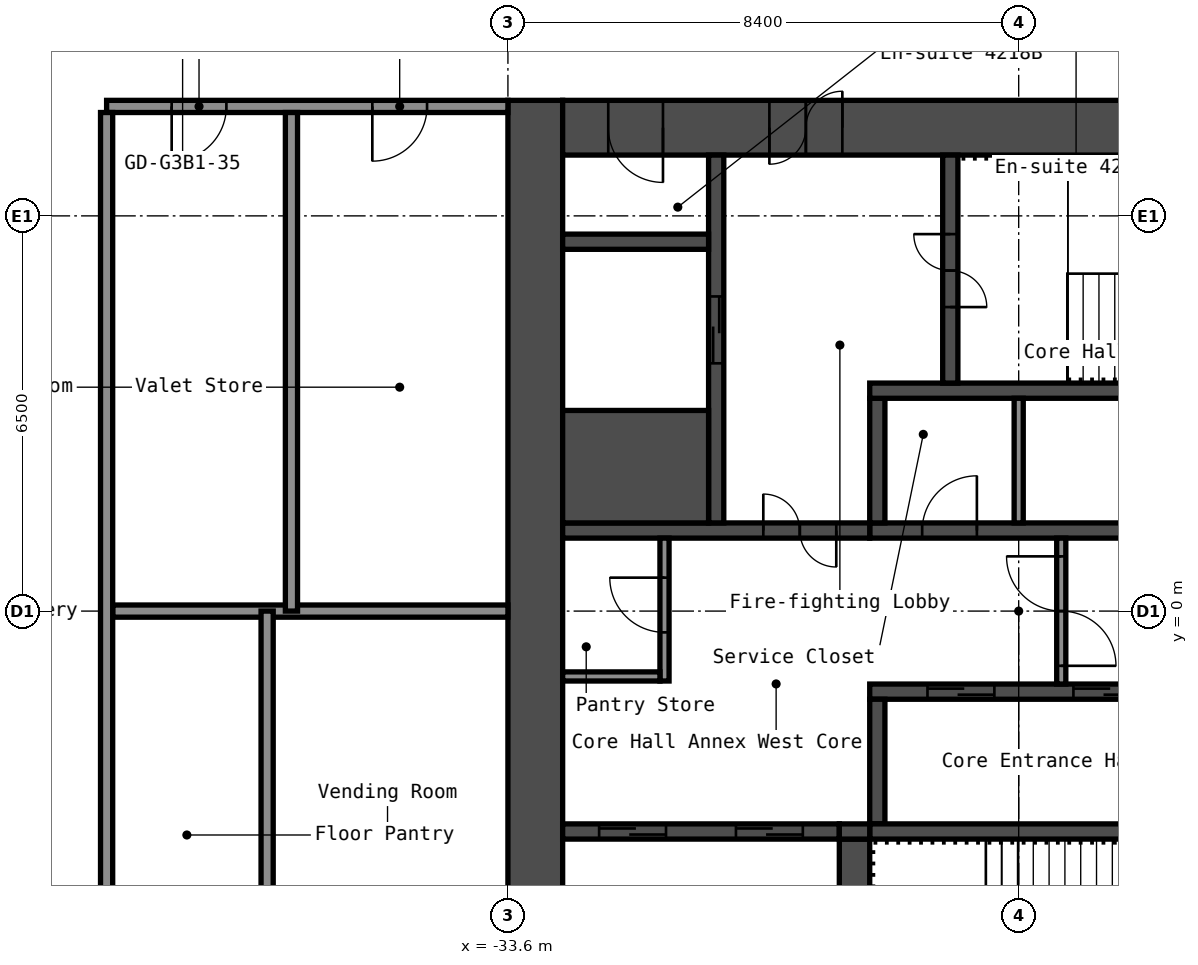
"""IFC4 building model, lengths in metres.
Left out: names, types, materials, properties, quantities, classifications, styles, units other than length and angle.
Written with IfcOpenShell. Run it as: python <this file> out.ifc"""

import sys

from ifc_helpers import new_model, si_unit, direction, frame, frame_2d, origin, place, context, subcontext, project, spatial, rectangle, extrude, element, fill, save


model = new_model("IFC4")
c1 = context("Model", 3, precision=1e-05, world=origin(), true_north=direction((0.0, 1.0)))
c2 = subcontext(c1, "Body", "Model", "MODEL_VIEW")
j1 = project(units=[si_unit("LENGTHUNIT", "METRE"), si_unit("PLANEANGLEUNIT", "RADIAN")], contexts=[c1])
p1 = place(None, origin())
s1 = spatial("IfcSite", under=j1, at=p1, CompositionType="ELEMENT")
p2 = place(p1, origin())
s2 = spatial("IfcBuilding", under=s1, at=p2, CompositionType="ELEMENT")
p3 = place(p2, frame((0.0, 0.0, 150.2)))
s3 = spatial("IfcBuildingStorey", under=s2, at=p3, CompositionType="ELEMENT", Elevation=150.2)
p4 = place(p3, frame((-33.15, -8.4, 0.0), z_axis=(0.0, 0.0, 1.0), x_axis=(0.0, 1.0, 0.0)))
e1 = element("IfcWall", 1, at=p4, inside=s3, PredefinedType="SHEAR", context=c2, shape_type="SweptSolid", body=[
    extrude(rectangle(XDim=16.8, YDim=0.9, at=frame_2d((8.4, 0.0))), origin(), (0.0, 0.0, 1.0), 2.75),
])
p5 = place(p3, frame((-32.7, 7.95, 0.0), z_axis=(0.0, 0.0, 1.0), x_axis=(1.0, 0.0, 0.0)))
e2 = element("IfcWall", 2, at=p5, inside=s3, PredefinedType="SHEAR", context=c2, shape_type="SweptSolid", body=[
    extrude(rectangle(XDim=15.0, YDim=0.9, at=frame_2d((7.5, 0.0))), origin(), (0.0, 0.0, 1.0), 2.75),
])
p6 = place(p5, frame((3.4, 0.0, 0.0)))
e3 = element("IfcOpeningElement", 3, at=p6, cuts=e2, PredefinedType="OPENING", context=c2, shape_type="SweptSolid", body=[
    extrude(rectangle(XDim=1.2, YDim=2.1, at=frame_2d((0.6, 1.05))), frame((0.0, 0.46, 0.0), z_axis=(0.0, -1.0, 0.0), x_axis=(1.0, 0.0, 0.0)), (0.0, 0.0, 1.0), 0.92),
])
p7 = place(p5, frame((0.75, 0.0, 0.0)))
e4 = element("IfcOpeningElement", 4, at=p7, cuts=e2, PredefinedType="OPENING", context=c2, shape_type="SweptSolid", body=[
    extrude(rectangle(XDim=0.9, YDim=2.1, at=frame_2d((0.45, 1.05))), frame((0.0, 0.46, 0.0), z_axis=(0.0, -1.0, 0.0), x_axis=(1.0, 0.0, 0.0)), (0.0, 0.0, 1.0), 0.92),
])
p8 = place(p3, frame((-27.65, 1.325, 0.0), z_axis=(0.0, 0.0, 1.0), x_axis=(1.0, 0.0, 0.0)))
e5 = element("IfcWall", 5, at=p8, inside=s3, PredefinedType="SHEAR", context=c2, shape_type="SweptSolid", body=[
    extrude(rectangle(XDim=7.5, YDim=0.25, at=frame_2d((3.75, 0.0))), origin(), (0.0, 0.0, 1.0), 2.75),
])
p9 = place(p8, frame((4.562, 0.0, 0.0)))
e6 = element("IfcOpeningElement", 6, at=p9, cuts=e5, PredefinedType="OPENING", context=c2, shape_type="SweptSolid", body=[
    extrude(rectangle(XDim=0.9, YDim=2.1, at=frame_2d((0.45, 1.05))), frame((0.0, 0.135, 0.0), z_axis=(0.0, -1.0, 0.0), x_axis=(1.0, 0.0, 0.0)), (0.0, 0.0, 1.0), 0.27),
])
p10 = place(p8, frame((0.863, 0.0, 0.0)))
e7 = element("IfcOpeningElement", 7, at=p10, cuts=e5, PredefinedType="OPENING", context=c2, shape_type="SweptSolid", body=[
    extrude(rectangle(XDim=0.9, YDim=2.1, at=frame_2d((0.45, 1.05))), frame((0.0, 0.135, 0.0), z_axis=(0.0, -1.0, 0.0), x_axis=(1.0, 0.0, 0.0)), (0.0, 0.0, 1.0), 0.27),
])
p11 = place(p3, frame((-27.525, 1.45, 0.0), z_axis=(0.0, 0.0, 1.0), x_axis=(0.0, 1.0, 0.0)))
e8 = element("IfcWall", 8, at=p11, inside=s3, PredefinedType="SHEAR", context=c2, shape_type="SweptSolid", body=[
    extrude(rectangle(XDim=2.05, YDim=0.25, at=frame_2d((1.025, 0.0))), origin(), (0.0, 0.0, 1.0), 2.75),
])
p12 = place(p3, frame((-27.65, 3.625, 0.0), z_axis=(0.0, 0.0, 1.0), x_axis=(1.0, 0.0, 0.0)))
e9 = element("IfcWall", 9, at=p12, inside=s3, PredefinedType="SHEAR", context=c2, shape_type="SweptSolid", body=[
    extrude(rectangle(XDim=7.5, YDim=0.25, at=frame_2d((3.75, 0.0))), origin(), (0.0, 0.0, 1.0), 2.75),
])
p13 = place(p3, frame((-26.325, 3.75, 0.0), z_axis=(0.0, 0.0, 1.0), x_axis=(0.0, 1.0, 0.0)))
e10 = element("IfcWall", 10, at=p13, inside=s3, PredefinedType="SHEAR", context=c2, shape_type="SweptSolid", body=[
    extrude(rectangle(XDim=3.75, YDim=0.25, at=frame_2d((1.875, 0.0))), origin(), (0.0, 0.0, 1.0), 2.75),
])
p14 = place(p13, frame((1.25, 0.0, 0.0)))
e11 = element("IfcOpeningElement", 11, at=p14, cuts=e10, PredefinedType="OPENING", context=c2, shape_type="SweptSolid", body=[
    extrude(rectangle(XDim=1.2, YDim=2.1, at=frame_2d((0.6, 1.05))), frame((0.0, 0.135, 0.0), z_axis=(0.0, -1.0, 0.0), x_axis=(1.0, 0.0, 0.0)), (0.0, 0.0, 1.0), 0.27),
])
p15 = place(p3, frame((-32.7, 1.325, 0.0), z_axis=(0.0, 0.0, 1.0), x_axis=(1.0, 0.0, 0.0)))
e12 = element("IfcWall", 12, at=p15, inside=s3, PredefinedType="SHEAR", context=c2, shape_type="SweptSolid", body=[
    extrude(rectangle(XDim=5.05, YDim=0.25, at=frame_2d((2.525, 0.0))), origin(), (0.0, 0.0, 1.0), 2.75),
])
p16 = place(p15, frame((3.3, 0.0, 0.0)))
e13 = element("IfcOpeningElement", 13, at=p16, cuts=e12, PredefinedType="OPENING", context=c2, shape_type="SweptSolid", body=[
    extrude(rectangle(XDim=1.2, YDim=2.1, at=frame_2d((0.6, 1.05))), frame((0.0, 0.135, 0.0), z_axis=(0.0, -1.0, 0.0), x_axis=(1.0, 0.0, 0.0)), (0.0, 0.0, 1.0), 0.27),
])
p17 = place(p3, frame((-30.175, 1.45, 0.0), z_axis=(0.0, 0.0, 1.0), x_axis=(0.0, 1.0, 0.0)))
e14 = element("IfcWall", 14, at=p17, inside=s3, PredefinedType="SHEAR", context=c2, shape_type="SweptSolid", body=[
    extrude(rectangle(XDim=6.05, YDim=0.25, at=frame_2d((3.025, 0.0))), origin(), (0.0, 0.0, 1.0), 2.75),
])
p18 = place(p17, frame((2.625, 0.0, 0.0)))
e15 = element("IfcOpeningElement", 15, at=p18, cuts=e14, PredefinedType="OPENING", context=c2, shape_type="SweptSolid", body=[
    extrude(rectangle(XDim=1.1, YDim=2.1, at=frame_2d((0.55, 1.05))), frame((0.0, 0.135, 0.0), z_axis=(0.0, -1.0, 0.0), x_axis=(1.0, 0.0, 0.0)), (0.0, 0.0, 1.0), 0.27),
])
p19 = place(p3, frame((-32.7, 2.375, 0.0), z_axis=(0.0, 0.0, 1.0), x_axis=(1.0, 0.0, 0.0)))
e16 = element("IfcWall", 16, at=p19, inside=s3, PredefinedType="SHEAR", context=c2, shape_type="SweptSolid", body=[
    extrude(rectangle(XDim=2.4, YDim=1.85, at=frame_2d((1.2, 0.0))), origin(), (0.0, 0.0, 1.0), 2.75),
])
p20 = place(p3, frame((-32.7, 6.075, 0.0), z_axis=(0.0, 0.0, 1.0), x_axis=(1.0, 0.0, 0.0)))
e17 = element("IfcWall", 17, at=p20, inside=s3, PredefinedType="SHEAR", context=c2, shape_type="SweptSolid", body=[
    extrude(rectangle(XDim=2.4, YDim=0.25, at=frame_2d((1.2, 0.0))), origin(), (0.0, 0.0, 1.0), 2.75),
])
p21 = place(p3, frame((-27.65, -1.325, 0.0), z_axis=(0.0, 0.0, 1.0), x_axis=(1.0, 0.0, 0.0)))
e18 = element("IfcWall", 18, at=p21, inside=s3, PredefinedType="SHEAR", context=c2, shape_type="SweptSolid", body=[
    extrude(rectangle(XDim=7.5, YDim=0.25, at=frame_2d((3.75, 0.0))), origin(), (0.0, 0.0, 1.0), 2.75),
])
p22 = place(p21, frame((5.75, 0.0, 0.0)))
e19 = element("IfcOpeningElement", 19, at=p22, cuts=e18, PredefinedType="OPENING", context=c2, shape_type="SweptSolid", body=[
    extrude(rectangle(XDim=1.1, YDim=2.1, at=frame_2d((0.55, 1.05))), frame((0.0, 0.135, 0.0), z_axis=(0.0, -1.0, 0.0), x_axis=(1.0, 0.0, 0.0)), (0.0, 0.0, 1.0), 0.27),
])
p23 = place(p21, frame((3.35, 0.0, 0.0)))
e20 = element("IfcOpeningElement", 20, at=p23, cuts=e18, PredefinedType="OPENING", context=c2, shape_type="SweptSolid", body=[
    extrude(rectangle(XDim=1.1, YDim=2.1, at=frame_2d((0.55, 1.05))), frame((0.0, 0.135, 0.0), z_axis=(0.0, -1.0, 0.0), x_axis=(1.0, 0.0, 0.0)), (0.0, 0.0, 1.0), 0.27),
])
p24 = place(p21, frame((0.95, 0.0, 0.0)))
e21 = element("IfcOpeningElement", 21, at=p24, cuts=e18, PredefinedType="OPENING", context=c2, shape_type="SweptSolid", body=[
    extrude(rectangle(XDim=1.1, YDim=2.1, at=frame_2d((0.55, 1.05))), frame((0.0, 0.135, 0.0), z_axis=(0.0, -1.0, 0.0), x_axis=(1.0, 0.0, 0.0)), (0.0, 0.0, 1.0), 0.27),
])
p25 = place(p3, frame((-27.525, -3.5, 0.0), z_axis=(0.0, 0.0, 1.0), x_axis=(0.0, 1.0, 0.0)))
e22 = element("IfcWall", 22, at=p25, inside=s3, PredefinedType="SHEAR", context=c2, shape_type="SweptSolid", body=[
    extrude(rectangle(XDim=2.05, YDim=0.25, at=frame_2d((1.025, 0.0))), origin(), (0.0, 0.0, 1.0), 2.75),
])
p26 = place(p3, frame((-27.65, -3.625, 0.0), z_axis=(0.0, 0.0, 1.0), x_axis=(1.0, 0.0, 0.0)))
e23 = element("IfcWall", 23, at=p26, inside=s3, PredefinedType="SHEAR", context=c2, shape_type="SweptSolid", body=[
    extrude(rectangle(XDim=7.5, YDim=0.25, at=frame_2d((3.75, 0.0))), origin(), (0.0, 0.0, 1.0), 2.75),
])
p27 = place(p3, frame((-27.9, -7.5, 0.0), z_axis=(0.0, 0.0, 1.0), x_axis=(0.0, 1.0, 0.0)))
e24 = element("IfcWall", 24, at=p27, inside=s3, PredefinedType="SHEAR", context=c2, shape_type="SweptSolid", body=[
    extrude(rectangle(XDim=3.75, YDim=0.5, at=frame_2d((1.875, 0.0))), origin(), (0.0, 0.0, 1.0), 2.75),
])
p28 = place(p3, frame((-32.7, -3.625, 0.0), z_axis=(0.0, 0.0, 1.0), x_axis=(1.0, 0.0, 0.0)))
e25 = element("IfcWall", 25, at=p28, inside=s3, PredefinedType="SHEAR", context=c2, shape_type="SweptSolid", body=[
    extrude(rectangle(XDim=4.55, YDim=0.25, at=frame_2d((2.275, 0.0))), origin(), (0.0, 0.0, 1.0), 2.75),
])
p29 = place(p28, frame((2.85, 0.0, 0.0)))
e26 = element("IfcOpeningElement", 26, at=p29, cuts=e25, PredefinedType="OPENING", context=c2, shape_type="SweptSolid", body=[
    extrude(rectangle(XDim=1.1, YDim=2.1, at=frame_2d((0.55, 1.05))), frame((0.0, 0.135, 0.0), z_axis=(0.0, -1.0, 0.0), x_axis=(1.0, 0.0, 0.0)), (0.0, 0.0, 1.0), 0.27),
])
p30 = place(p28, frame((0.6, 0.0, 0.0)))
e27 = element("IfcOpeningElement", 27, at=p30, cuts=e25, PredefinedType="OPENING", context=c2, shape_type="SweptSolid", body=[
    extrude(rectangle(XDim=1.1, YDim=2.1, at=frame_2d((0.55, 1.05))), frame((0.0, 0.135, 0.0), z_axis=(0.0, -1.0, 0.0), x_axis=(1.0, 0.0, 0.0)), (0.0, 0.0, 1.0), 0.27),
])
p31 = place(p3, frame((-28.15, -3.625, 0.0), z_axis=(0.0, 0.0, 1.0), x_axis=(1.0, 0.0, 0.0)))
e28 = element("IfcWall", 28, at=p31, inside=s3, PredefinedType="SHEAR", context=c2, shape_type="SweptSolid", body=[
    extrude(rectangle(XDim=0.5, YDim=0.25, at=frame_2d((0.25, 0.0))), origin(), (0.0, 0.0, 1.0), 2.75),
])
p32 = place(p3, frame((-24.5, -1.2, 0.0), z_axis=(0.0, 0.0, 1.0), x_axis=(0.0, 1.0, 0.0)))
e29 = element("IfcWall", 29, at=p32, inside=s3, PredefinedType="PARTITIONING", context=c2, shape_type="SweptSolid", body=[
    extrude(rectangle(XDim=2.4, YDim=0.15, at=frame_2d((1.2, 0.0))), origin(), (0.0, 0.0, 1.0), 2.75),
])
p33 = place(p32, frame((0.3, 0.0, 0.0)))
e30 = element("IfcOpeningElement", 30, at=p33, cuts=e29, PredefinedType="OPENING", context=c2, shape_type="SweptSolid", body=[
    extrude(rectangle(XDim=1.8, YDim=2.1, at=frame_2d((0.9, 1.05))), frame((0.0, 0.085, 0.0), z_axis=(0.0, -1.0, 0.0), x_axis=(1.0, 0.0, 0.0)), (0.0, 0.0, 1.0), 0.17),
])
p34 = place(p3, frame((-31.025, -1.15, 0.0), z_axis=(0.0, 0.0, 1.0), x_axis=(0.0, 1.0, 0.0)))
e31 = element("IfcWall", 31, at=p34, inside=s3, PredefinedType="PARTITIONING", context=c2, shape_type="SweptSolid", body=[
    extrude(rectangle(XDim=2.35, YDim=0.15, at=frame_2d((1.175, 0.0))), origin(), (0.0, 0.0, 1.0), 2.75),
])
p35 = place(p34, frame((0.8, 0.0, 0.0)))
e32 = element("IfcOpeningElement", 32, at=p35, cuts=e31, PredefinedType="OPENING", context=c2, shape_type="SweptSolid", body=[
    extrude(rectangle(XDim=0.9, YDim=2.1, at=frame_2d((0.45, 1.05))), frame((0.0, 0.085, 0.0), z_axis=(0.0, -1.0, 0.0), x_axis=(1.0, 0.0, 0.0)), (0.0, 0.0, 1.0), 0.17),
])
p36 = place(p3, frame((-32.7, -1.075, 0.0), z_axis=(0.0, 0.0, 1.0), x_axis=(1.0, 0.0, 0.0)))
e33 = element("IfcWall", 33, at=p36, inside=s3, PredefinedType="PARTITIONING", context=c2, shape_type="SweptSolid", body=[
    extrude(rectangle(XDim=1.6, YDim=0.15, at=frame_2d((0.8, 0.0))), origin(), (0.0, 0.0, 1.0), 2.75),
])
p37 = place(p3, frame((-25.2, 1.45, 0.0), z_axis=(0.0, 0.0, 1.0), x_axis=(0.0, 1.0, 0.0)))
e34 = element("IfcWall", 34, at=p37, inside=s3, PredefinedType="PARTITIONING", context=c2, shape_type="SweptSolid", body=[
    extrude(rectangle(XDim=2.05, YDim=0.15, at=frame_2d((1.025, 0.0))), origin(), (0.0, 0.0, 1.0), 2.75),
])
p38 = place(p3, frame((-40.1, 0.0, 0.0), z_axis=(0.0, 0.0, 1.0), x_axis=(1.0, 0.0, 0.0)))
e35 = element("IfcWall", 35, at=p38, inside=s3, PredefinedType="PARTITIONING", context=c2, shape_type="SweptSolid", body=[
    extrude(rectangle(XDim=6.5, YDim=0.2, at=frame_2d((3.25, 0.0))), origin(), (0.0, 0.0, 1.0), 2.75),
])
p39 = place(p3, frame((-40.2, 8.3, 0.0), z_axis=(0.0, 0.0, 1.0), x_axis=(1.0, 0.0, 0.0)))
e36 = element("IfcWall", 36, at=p39, inside=s3, PredefinedType="PARTITIONING", context=c2, shape_type="SweptSolid", body=[
    extrude(rectangle(XDim=6.6, YDim=0.2, at=frame_2d((3.3, 0.0))), origin(), (0.0, 0.0, 1.0), 2.75),
])
p40 = place(p39, frame((1.07, 0.0, 0.0)))
e37 = element("IfcOpeningElement", 37, at=p40, cuts=e36, PredefinedType="OPENING", context=c2, shape_type="SweptSolid", body=[
    extrude(rectangle(XDim=0.9, YDim=2.1, at=frame_2d((0.45, 1.05))), frame((0.0, 0.11, 0.0), z_axis=(0.0, -1.0, 0.0), x_axis=(1.0, 0.0, 0.0)), (0.0, 0.0, 1.0), 0.22),
])
p41 = place(p39, frame((4.37, 0.0, 0.0)))
e38 = element("IfcOpeningElement", 38, at=p41, cuts=e36, PredefinedType="OPENING", context=c2, shape_type="SweptSolid", body=[
    extrude(rectangle(XDim=0.9, YDim=2.1, at=frame_2d((0.45, 1.05))), frame((0.0, 0.11, 0.0), z_axis=(0.0, -1.0, 0.0), x_axis=(1.0, 0.0, 0.0)), (0.0, 0.0, 1.0), 0.22),
])
p42 = place(p3, frame((-40.2, -8.2, 0.0), z_axis=(0.0, 0.0, 1.0), x_axis=(0.0, 1.0, 0.0)))
e39 = element("IfcWall", 39, at=p42, inside=s3, PredefinedType="PARTITIONING", context=c2, shape_type="SweptSolid", body=[
    extrude(rectangle(XDim=16.4, YDim=0.2, at=frame_2d((8.2, 0.0))), origin(), (0.0, 0.0, 1.0), 2.75),
])
for number, where, z_axis, x_axis in (
    (40, (-37.56, -8.2, 0.0), (0.0, 0.0, 1.0), (0.0, 1.0, 0.0)),
    (41, (-37.16, 0.0, 0.0), (0.0, 0.0, 1.0), (0.0, 1.0, 0.0)),
):
    element("IfcWall", number, at=place(p3, frame(where, z_axis=z_axis, x_axis=x_axis)), inside=s3, PredefinedType="PARTITIONING", context=c2, shape_type="SweptSolid", body=[
        extrude(rectangle(XDim=8.2, YDim=0.2, at=frame_2d((4.1, 0.0))), origin(), (0.0, 0.0, 1.0), 2.75),
    ])
p43 = place(p6, origin())
e42 = element("IfcDoor", 42, at=p43, inside=s3, OperationType="DOUBLE_DOOR_SINGLE_SWING", PredefinedType="DOOR", context=c2, shape_type="SweptSolid", body=[
    extrude(rectangle(XDim=1.2, YDim=2.1, at=frame_2d((0.6, 1.05))), frame((0.0, 0.025, 0.0), z_axis=(0.0, -1.0, 0.0), x_axis=(1.0, 0.0, 0.0)), (0.0, 0.0, 1.0), 0.05),
])
fill(e3, e42)
p44 = place(p7, origin())
e43 = element("IfcDoor", 43, at=p44, inside=s3, OperationType="SINGLE_SWING_RIGHT", PredefinedType="DOOR", context=c2, shape_type="SweptSolid", body=[
    extrude(rectangle(XDim=0.9, YDim=2.1, at=frame_2d((0.45, 1.05))), frame((0.0, 0.025, 0.0), z_axis=(0.0, -1.0, 0.0), x_axis=(1.0, 0.0, 0.0)), (0.0, 0.0, 1.0), 0.05),
])
fill(e4, e43)
p45 = place(p14, origin())
e44 = element("IfcDoor", 44, at=p45, inside=s3, OperationType="DOUBLE_DOOR_SINGLE_SWING", PredefinedType="DOOR", context=c2, shape_type="SweptSolid", body=[
    extrude(rectangle(XDim=1.2, YDim=2.1, at=frame_2d((0.6, 1.05))), frame((0.0, 0.025, 0.0), z_axis=(0.0, -1.0, 0.0), x_axis=(1.0, 0.0, 0.0)), (0.0, 0.0, 1.0), 0.05),
])
fill(e11, e44)
p46 = place(p16, origin())
e45 = element("IfcDoor", 45, at=p46, inside=s3, OperationType="DOUBLE_DOOR_SINGLE_SWING", PredefinedType="DOOR", context=c2, shape_type="SweptSolid", body=[
    extrude(rectangle(XDim=1.2, YDim=2.1, at=frame_2d((0.6, 1.05))), frame((0.0, 0.025, 0.0), z_axis=(0.0, -1.0, 0.0), x_axis=(1.0, 0.0, 0.0)), (0.0, 0.0, 1.0), 0.05),
])
fill(e13, e45)
p47 = place(p33, origin())
e46 = element("IfcDoor", 46, at=p47, inside=s3, OperationType="DOUBLE_DOOR_SINGLE_SWING", PredefinedType="DOOR", context=c2, shape_type="SweptSolid", body=[
    extrude(rectangle(XDim=1.8, YDim=2.1, at=frame_2d((0.9, 1.05))), frame((0.0, 0.025, 0.0), z_axis=(0.0, -1.0, 0.0), x_axis=(1.0, 0.0, 0.0)), (0.0, 0.0, 1.0), 0.05),
])
fill(e30, e46)
p48 = place(p35, origin())
e47 = element("IfcDoor", 47, at=p48, inside=s3, OperationType="SINGLE_SWING_LEFT", PredefinedType="DOOR", context=c2, shape_type="SweptSolid", body=[
    extrude(rectangle(XDim=0.9, YDim=2.1, at=frame_2d((0.45, 1.05))), frame((0.0, 0.025, 0.0), z_axis=(0.0, -1.0, 0.0), x_axis=(1.0, 0.0, 0.0)), (0.0, 0.0, 1.0), 0.05),
])
fill(e32, e47)
p49 = place(p10, origin())
e48 = element("IfcDoor", 48, at=p49, inside=s3, OperationType="SINGLE_SWING_LEFT", PredefinedType="DOOR", context=c2, shape_type="SweptSolid", body=[
    extrude(rectangle(XDim=0.9, YDim=2.1, at=frame_2d((0.45, 1.05))), frame((0.0, 0.025, 0.0), z_axis=(0.0, -1.0, 0.0), x_axis=(1.0, 0.0, 0.0)), (0.0, 0.0, 1.0), 0.05),
])
fill(e7, e48)
p50 = place(p23, origin())
e49 = element("IfcDoor", 49, at=p50, inside=s3, OperationType="DOUBLE_DOOR_SLIDING", PredefinedType="DOOR", context=c2, shape_type="SweptSolid", body=[
    extrude(rectangle(XDim=1.1, YDim=2.1, at=frame_2d((0.55, 1.05))), frame((0.0, 0.025, 0.0), z_axis=(0.0, -1.0, 0.0), x_axis=(1.0, 0.0, 0.0)), (0.0, 0.0, 1.0), 0.05),
])
fill(e20, e49)
p51 = place(p24, origin())
e50 = element("IfcDoor", 50, at=p51, inside=s3, OperationType="DOUBLE_DOOR_SLIDING", PredefinedType="DOOR", context=c2, shape_type="SweptSolid", body=[
    extrude(rectangle(XDim=1.1, YDim=2.1, at=frame_2d((0.55, 1.05))), frame((0.0, 0.025, 0.0), z_axis=(0.0, -1.0, 0.0), x_axis=(1.0, 0.0, 0.0)), (0.0, 0.0, 1.0), 0.05),
])
fill(e21, e50)
p52 = place(p18, origin())
e51 = element("IfcDoor", 51, at=p52, inside=s3, OperationType="DOUBLE_DOOR_SLIDING", PredefinedType="DOOR", context=c2, shape_type="SweptSolid", body=[
    extrude(rectangle(XDim=1.1, YDim=2.1, at=frame_2d((0.55, 1.05))), frame((0.0, 0.025, 0.0), z_axis=(0.0, -1.0, 0.0), x_axis=(1.0, 0.0, 0.0)), (0.0, 0.0, 1.0), 0.05),
])
fill(e15, e51)
p53 = place(p29, origin())
e52 = element("IfcDoor", 52, at=p53, inside=s3, OperationType="DOUBLE_DOOR_SLIDING", PredefinedType="DOOR", context=c2, shape_type="SweptSolid", body=[
    extrude(rectangle(XDim=1.1, YDim=2.1, at=frame_2d((0.55, 1.05))), frame((0.0, 0.025, 0.0), z_axis=(0.0, -1.0, 0.0), x_axis=(1.0, 0.0, 0.0)), (0.0, 0.0, 1.0), 0.05),
])
fill(e26, e52)
p54 = place(p30, origin())
e53 = element("IfcDoor", 53, at=p54, inside=s3, OperationType="DOUBLE_DOOR_SLIDING", PredefinedType="DOOR", context=c2, shape_type="SweptSolid", body=[
    extrude(rectangle(XDim=1.1, YDim=2.1, at=frame_2d((0.55, 1.05))), frame((0.0, 0.025, 0.0), z_axis=(0.0, -1.0, 0.0), x_axis=(1.0, 0.0, 0.0)), (0.0, 0.0, 1.0), 0.05),
])
fill(e27, e53)
p55 = place(p40, origin())
e54 = element("IfcDoor", 54, at=p55, inside=s3, OperationType="SINGLE_SWING_LEFT", PredefinedType="DOOR", context=c2, shape_type="SweptSolid", body=[
    extrude(rectangle(XDim=0.9, YDim=2.1, at=frame_2d((0.45, 1.05))), frame((0.0, 0.025, 0.0), z_axis=(0.0, -1.0, 0.0), x_axis=(1.0, 0.0, 0.0)), (0.0, 0.0, 1.0), 0.05),
])
fill(e37, e54)
p56 = place(p41, origin())
e55 = element("IfcDoor", 55, at=p56, inside=s3, OperationType="SINGLE_SWING_LEFT", PredefinedType="DOOR", context=c2, shape_type="SweptSolid", body=[
    extrude(rectangle(XDim=0.9, YDim=2.1, at=frame_2d((0.45, 1.05))), frame((0.0, 0.025, 0.0), z_axis=(0.0, -1.0, 0.0), x_axis=(1.0, 0.0, 0.0)), (0.0, 0.0, 1.0), 0.05),
])
fill(e38, e55)
save(model, sys.argv[1])
